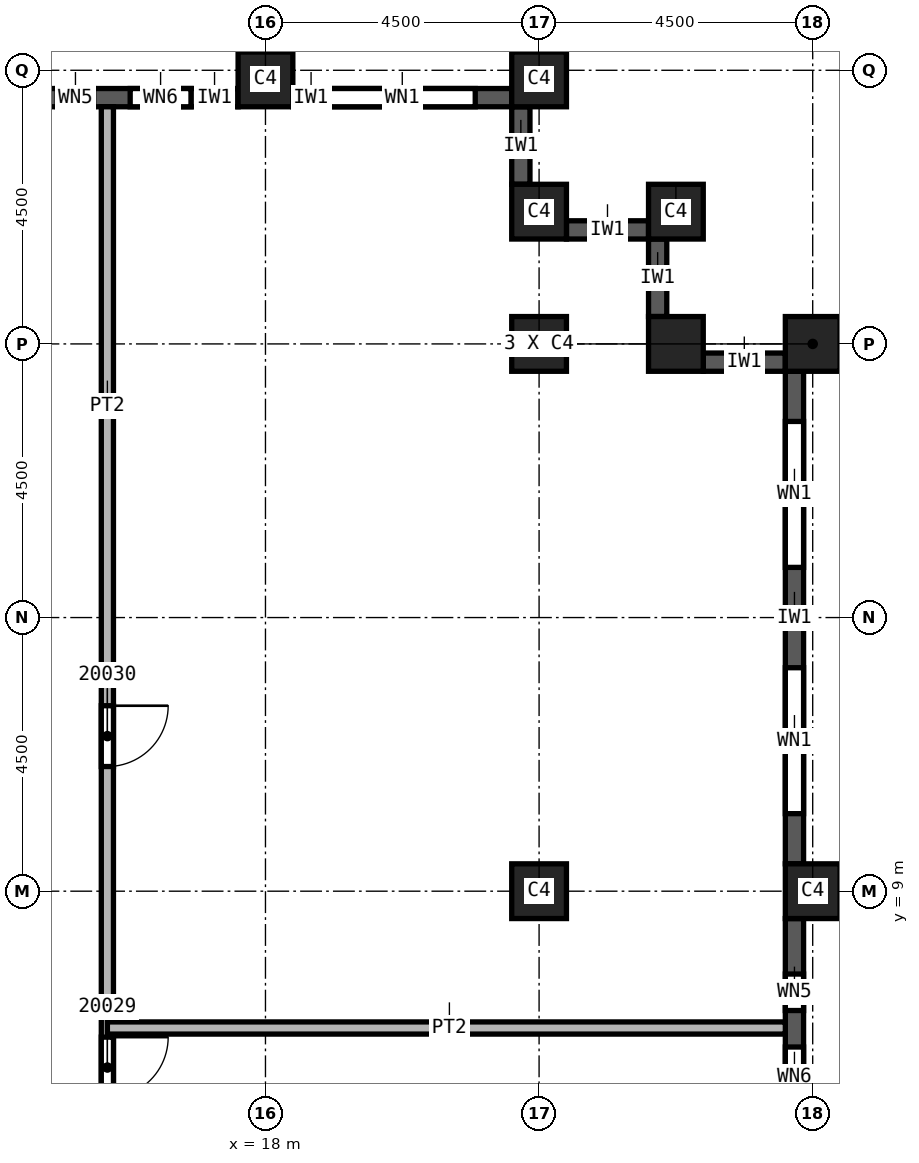
"""IFC4 building model, lengths in metres.
Left out: names, types, materials, properties, quantities, classifications, styles, units other than length and angle.
Written with IfcOpenShell. Run it as: python <this file> out.ifc"""

import sys

from ifc_helpers import new_model, si_unit, direction, frame, frame_2d, origin, origin_2d, place, context, subcontext, project, spatial, rectangle, extrude, element, fill, save


model = new_model("IFC4")
c1 = context("Model", 3, precision=1e-05, world=origin(), true_north=direction((0.0, 1.0)))
c2 = subcontext(c1, "Body", "Model", "MODEL_VIEW")
j1 = project(units=[si_unit("LENGTHUNIT", "METRE"), si_unit("PLANEANGLEUNIT", "RADIAN")], contexts=[c1])
p1 = place(None, origin())
s1 = spatial("IfcSite", under=j1, at=p1, CompositionType="ELEMENT")
p2 = place(p1, origin())
s2 = spatial("IfcBuilding", under=s1, at=p2, CompositionType="ELEMENT")
p3 = place(p2, frame((0.0, 0.0, 286.0)))
s3 = spatial("IfcBuildingStorey", under=s2, at=p3, CompositionType="ELEMENT", Elevation=286.0)
for number, where, z_axis, x_axis in (
    (1, (22.5, 9.0, 0.0), (0.0, 0.0, 1.0), (1.0, 0.0, 0.0)),
    (2, (22.5, 18.0, 0.0), (0.0, 0.0, 1.0), (1.0, 0.0, 0.0)),
    (3, (27.0, 9.0, 0.0), (0.0, 0.0, 1.0), (0.0, 1.0, 0.0)),
    (4, (27.0, 18.0, 0.0), (0.0, 0.0, 1.0), (0.0, 1.0, 0.0)),
    (5, (18.0, 22.35, 0.0), (0.0, 0.0, 1.0), (1.0, 0.0, 0.0)),
    (6, (22.5, 22.35, 0.0), (0.0, 0.0, 1.0), (1.0, 0.0, 0.0)),
    (7, (22.5, 20.175, 0.0), (0.0, 0.0, 1.0), (1.0, 0.0, 0.0)),
    (8, (24.75, 20.175, 0.0), (0.0, 0.0, 1.0), (1.0, 0.0, 0.0)),
    (9, (24.75, 18.0, 0.0), (0.0, 0.0, 1.0), (1.0, 0.0, 0.0)),
):
    element("IfcColumn", number, at=place(p3, frame(where, z_axis=z_axis, x_axis=x_axis)), inside=s3, PredefinedType="COLUMN", context=c2, shape_type="SweptSolid", body=[
        extrude(rectangle(XDim=0.9, YDim=0.9, at=origin_2d()), origin(), (0.0, 0.0, 1.0), 3.72),
    ])
p4 = place(p3, frame((26.7, 0.45, 0.0), z_axis=(0.0, 0.0, 1.0), x_axis=(0.0, 1.0, 0.0)))
e10 = element("IfcWall", 10, at=p4, inside=s3, PredefinedType="SOLIDWALL", context=c2, shape_type="SweptSolid", body=[
    extrude(rectangle(XDim=8.1, YDim=0.3, at=frame_2d((4.05, 0.0))), origin(), (0.0, 0.0, 1.0), 3.12),
])
p5 = place(p4, frame((0.875, 0.0, 0.8)))
e11 = element("IfcOpeningElement", 11, at=p5, cuts=e10, PredefinedType="OPENING", context=c2, shape_type="SweptSolid", body=[
    extrude(rectangle(XDim=1.8, YDim=1.95, at=frame_2d((0.9, 0.975))), frame((0.0, 0.15, 0.0), z_axis=(0.0, -1.0, 0.0), x_axis=(1.0, 0.0, 0.0)), (0.0, 0.0, 1.0), 0.3),
])
p6 = place(p4, frame((4.988, 0.0, 0.8)))
e12 = element("IfcOpeningElement", 12, at=p6, cuts=e10, PredefinedType="OPENING", context=c2, shape_type="SweptSolid", body=[
    extrude(rectangle(XDim=1.0, YDim=1.95, at=frame_2d((0.5, 0.975))), frame((0.0, 0.15, 0.0), z_axis=(0.0, -1.0, 0.0), x_axis=(1.0, 0.0, 0.0)), (0.0, 0.0, 1.0), 0.3),
])
p7 = place(p4, frame((6.587, 0.0, 0.8)))
e13 = element("IfcOpeningElement", 13, at=p7, cuts=e10, PredefinedType="OPENING", context=c2, shape_type="SweptSolid", body=[
    extrude(rectangle(XDim=0.6, YDim=1.95, at=frame_2d((0.3, 0.975))), frame((0.0, 0.15, 0.0), z_axis=(0.0, -1.0, 0.0), x_axis=(1.0, 0.0, 0.0)), (0.0, 0.0, 1.0), 0.3),
])
p8 = place(p3, frame((26.7, 9.45, 0.0), z_axis=(0.0, 0.0, 1.0), x_axis=(0.0, 1.0, 0.0)))
e14 = element("IfcWall", 14, at=p8, inside=s3, PredefinedType="SOLIDWALL", context=c2, shape_type="SweptSolid", body=[
    extrude(rectangle(XDim=8.1, YDim=0.3, at=frame_2d((4.05, 0.0))), origin(), (0.0, 0.0, 1.0), 3.12),
])
p9 = place(p8, frame((0.825, 0.0, 0.8)))
e15 = element("IfcOpeningElement", 15, at=p9, cuts=e14, PredefinedType="OPENING", context=c2, shape_type="SweptSolid", body=[
    extrude(rectangle(XDim=2.4, YDim=1.95, at=frame_2d((1.2, 0.975))), frame((0.0, 0.15, 0.0), z_axis=(0.0, -1.0, 0.0), x_axis=(1.0, 0.0, 0.0)), (0.0, 0.0, 1.0), 0.3),
])
p10 = place(p8, frame((4.875, 0.0, 0.8)))
e16 = element("IfcOpeningElement", 16, at=p10, cuts=e14, PredefinedType="OPENING", context=c2, shape_type="SweptSolid", body=[
    extrude(rectangle(XDim=2.4, YDim=1.95, at=frame_2d((1.2, 0.975))), frame((0.0, 0.15, 0.0), z_axis=(0.0, -1.0, 0.0), x_axis=(1.0, 0.0, 0.0)), (0.0, 0.0, 1.0), 0.3),
])
p11 = place(p3, frame((26.55, 17.7, 0.0), z_axis=(0.0, 0.0, 1.0), x_axis=(-1.0, 0.0, 0.0)))
e17 = element("IfcWall", 17, at=p11, inside=s3, PredefinedType="SOLIDWALL", context=c2, shape_type="SweptSolid", body=[
    extrude(rectangle(XDim=1.35, YDim=0.3, at=frame_2d((0.675, 0.0))), origin(), (0.0, 0.0, 1.0), 3.12),
])
p12 = place(p3, frame((24.45, 18.45, 0.0), z_axis=(0.0, 0.0, 1.0), x_axis=(0.0, 1.0, 0.0)))
e18 = element("IfcWall", 18, at=p12, inside=s3, PredefinedType="SOLIDWALL", context=c2, shape_type="SweptSolid", body=[
    extrude(rectangle(XDim=1.275, YDim=0.3, at=frame_2d((0.638, 0.0))), origin(), (0.0, 0.0, 1.0), 3.12),
])
p13 = place(p3, frame((24.3, 19.875, 0.0), z_axis=(0.0, 0.0, 1.0), x_axis=(-1.0, 0.0, 0.0)))
e19 = element("IfcWall", 19, at=p13, inside=s3, PredefinedType="SOLIDWALL", context=c2, shape_type="SweptSolid", body=[
    extrude(rectangle(XDim=1.35, YDim=0.3, at=frame_2d((0.675, 0.0))), origin(), (0.0, 0.0, 1.0), 3.12),
])
p14 = place(p3, frame((22.2, 20.625, 0.0), z_axis=(0.0, 0.0, 1.0), x_axis=(0.0, 1.0, 0.0)))
e20 = element("IfcWall", 20, at=p14, inside=s3, PredefinedType="SOLIDWALL", context=c2, shape_type="SweptSolid", body=[
    extrude(rectangle(XDim=1.275, YDim=0.3, at=frame_2d((0.637, 0.0))), origin(), (0.0, 0.0, 1.0), 3.12),
])
p15 = place(p3, frame((22.05, 22.05, 0.0), z_axis=(0.0, 0.0, 1.0), x_axis=(-1.0, 0.0, 0.0)))
e21 = element("IfcWall", 21, at=p15, inside=s3, PredefinedType="SOLIDWALL", context=c2, shape_type="SweptSolid", body=[
    extrude(rectangle(XDim=3.6, YDim=0.3, at=frame_2d((1.8, 0.0))), origin(), (0.0, 0.0, 1.0), 3.12),
])
p16 = place(p15, frame((0.6, 0.0, 0.8)))
e22 = element("IfcOpeningElement", 22, at=p16, cuts=e21, PredefinedType="OPENING", context=c2, shape_type="SweptSolid", body=[
    extrude(rectangle(XDim=2.4, YDim=1.95, at=frame_2d((1.2, 0.975))), frame((0.0, 0.15, 0.0), z_axis=(0.0, -1.0, 0.0), x_axis=(1.0, 0.0, 0.0)), (0.0, 0.0, 1.0), 0.3),
])
p17 = place(p3, frame((17.55, 22.05, 0.0), z_axis=(0.0, 0.0, 1.0), x_axis=(-1.0, 0.0, 0.0)))
e23 = element("IfcWall", 23, at=p17, inside=s3, PredefinedType="SOLIDWALL", context=c2, shape_type="SweptSolid", body=[
    extrude(rectangle(XDim=3.6, YDim=0.3, at=frame_2d((1.8, 0.0))), origin(), (0.0, 0.0, 1.0), 3.12),
])
p18 = place(p17, frame((0.775, 0.0, 0.8)))
e24 = element("IfcOpeningElement", 24, at=p18, cuts=e23, PredefinedType="OPENING", context=c2, shape_type="SweptSolid", body=[
    extrude(rectangle(XDim=1.0, YDim=1.95, at=frame_2d((0.5, 0.975))), frame((0.0, 0.15, 0.0), z_axis=(0.0, -1.0, 0.0), x_axis=(1.0, 0.0, 0.0)), (0.0, 0.0, 1.0), 0.3),
])
p19 = place(p17, frame((2.375, 0.0, 0.8)))
e25 = element("IfcOpeningElement", 25, at=p19, cuts=e23, PredefinedType="OPENING", context=c2, shape_type="SweptSolid", body=[
    extrude(rectangle(XDim=0.6, YDim=1.95, at=frame_2d((0.3, 0.975))), frame((0.0, 0.15, 0.0), z_axis=(0.0, -1.0, 0.0), x_axis=(1.0, 0.0, 0.0)), (0.0, 0.0, 1.0), 0.3),
])
p20 = place(p3, frame((15.4, 21.9, 0.0), z_axis=(0.0, 0.0, 1.0), x_axis=(0.0, -1.0, 0.0)))
e26 = element("IfcWall", 26, at=p20, inside=s3, PredefinedType="PARTITIONING", context=c2, shape_type="SweptSolid", body=[
    extrude(rectangle(XDim=43.8, YDim=0.2, at=frame_2d((21.9, 0.0))), origin(), (0.0, 0.0, 1.0), 3.72),
])
p21 = place(p20, frame((18.675, 0.0, 0.0)))
e27 = element("IfcOpeningElement", 27, at=p21, cuts=e26, PredefinedType="OPENING", context=c2, shape_type="SweptSolid", body=[
    extrude(rectangle(XDim=1.0, YDim=2.1, at=frame_2d((0.5, 1.05))), frame((0.0, 0.1, 0.0), z_axis=(0.0, -1.0, 0.0), x_axis=(1.0, 0.0, 0.0)), (0.0, 0.0, 1.0), 0.2),
])
p22 = place(p20, frame((15.3, 0.0, 0.0)))
e28 = element("IfcOpeningElement", 28, at=p22, cuts=e26, PredefinedType="OPENING", context=c2, shape_type="SweptSolid", body=[
    extrude(rectangle(XDim=1.0, YDim=2.1, at=frame_2d((0.5, 1.05))), frame((0.0, 0.1, 0.0), z_axis=(0.0, -1.0, 0.0), x_axis=(1.0, 0.0, 0.0)), (0.0, 0.0, 1.0), 0.2),
])
p23 = place(p20, frame((9.85, 0.0, 0.0)))
e29 = element("IfcOpeningElement", 29, at=p23, cuts=e26, PredefinedType="OPENING", context=c2, shape_type="SweptSolid", body=[
    extrude(rectangle(XDim=1.0, YDim=2.1, at=frame_2d((0.5, 1.05))), frame((0.0, 0.1, 0.0), z_axis=(0.0, -1.0, 0.0), x_axis=(1.0, 0.0, 0.0)), (0.0, 0.0, 1.0), 0.2),
])
p24 = place(p20, frame((42.0, 0.0, 0.0)))
e30 = element("IfcOpeningElement", 30, at=p24, cuts=e26, PredefinedType="OPENING", context=c2, shape_type="SweptSolid", body=[
    extrude(rectangle(XDim=1.0, YDim=2.1, at=frame_2d((0.5, 1.05))), frame((0.0, 0.1, 0.0), z_axis=(0.0, -1.0, 0.0), x_axis=(1.0, 0.0, 0.0)), (0.0, 0.0, 1.0), 0.2),
])
p25 = place(p20, frame((34.65, 0.0, 0.0)))
e31 = element("IfcOpeningElement", 31, at=p25, cuts=e26, PredefinedType="OPENING", context=c2, shape_type="SweptSolid", body=[
    extrude(rectangle(XDim=1.0, YDim=2.1, at=frame_2d((0.5, 1.05))), frame((0.0, 0.1, 0.0), z_axis=(0.0, -1.0, 0.0), x_axis=(1.0, 0.0, 0.0)), (0.0, 0.0, 1.0), 0.2),
])
p26 = place(p20, frame((25.95, 0.0, 0.0)))
e32 = element("IfcOpeningElement", 32, at=p26, cuts=e26, PredefinedType="OPENING", context=c2, shape_type="SweptSolid", body=[
    extrude(rectangle(XDim=1.0, YDim=2.1, at=frame_2d((0.5, 1.05))), frame((0.0, 0.1, 0.0), z_axis=(0.0, -1.0, 0.0), x_axis=(1.0, 0.0, 0.0)), (0.0, 0.0, 1.0), 0.2),
])
p27 = place(p3, frame((15.4, 6.75, 0.0), z_axis=(0.0, 0.0, 1.0), x_axis=(1.0, 0.0, 0.0)))
e33 = element("IfcWall", 33, at=p27, inside=s3, PredefinedType="PARTITIONING", context=c2, shape_type="SweptSolid", body=[
    extrude(rectangle(XDim=11.15, YDim=0.2, at=frame_2d((5.575, 0.0))), origin(), (0.0, 0.0, 1.0), 3.72),
])
p28 = place(p9, origin())
e34 = element("IfcWindow", 34, at=p28, inside=s3, PartitioningType="SINGLE_PANEL", PredefinedType="WINDOW", context=c2, shape_type="SweptSolid", body=[
    extrude(rectangle(XDim=2.4, YDim=1.95, at=frame_2d((1.2, 0.975))), frame((0.0, 0.03, 0.0), z_axis=(0.0, -1.0, 0.0), x_axis=(1.0, 0.0, 0.0)), (0.0, 0.0, 1.0), 0.06),
])
fill(e15, e34)
p29 = place(p10, origin())
e35 = element("IfcWindow", 35, at=p29, inside=s3, PartitioningType="SINGLE_PANEL", PredefinedType="WINDOW", context=c2, shape_type="SweptSolid", body=[
    extrude(rectangle(XDim=2.4, YDim=1.95, at=frame_2d((1.2, 0.975))), frame((0.0, 0.03, 0.0), z_axis=(0.0, -1.0, 0.0), x_axis=(1.0, 0.0, 0.0)), (0.0, 0.0, 1.0), 0.06),
])
fill(e16, e35)
p30 = place(p16, origin())
e36 = element("IfcWindow", 36, at=p30, inside=s3, PartitioningType="SINGLE_PANEL", PredefinedType="WINDOW", context=c2, shape_type="SweptSolid", body=[
    extrude(rectangle(XDim=2.4, YDim=1.95, at=frame_2d((1.2, 0.975))), frame((0.0, 0.03, 0.0), z_axis=(0.0, -1.0, 0.0), x_axis=(1.0, 0.0, 0.0)), (0.0, 0.0, 1.0), 0.06),
])
fill(e22, e36)
p31 = place(p22, origin())
e37 = element("IfcDoor", 37, at=p31, inside=s3, OperationType="SINGLE_SWING_RIGHT", PredefinedType="DOOR", context=c2, shape_type="SweptSolid", body=[
    extrude(rectangle(XDim=1.0, YDim=2.1, at=frame_2d((0.5, 1.05))), frame((0.0, 0.025, 0.0), z_axis=(0.0, -1.0, 0.0), x_axis=(1.0, 0.0, 0.0)), (0.0, 0.0, 1.0), 0.05),
])
fill(e28, e37)
p32 = place(p23, origin())
e38 = element("IfcDoor", 38, at=p32, inside=s3, OperationType="SINGLE_SWING_LEFT", PredefinedType="DOOR", context=c2, shape_type="SweptSolid", body=[
    extrude(rectangle(XDim=1.0, YDim=2.1, at=frame_2d((0.5, 1.05))), frame((0.0, 0.025, 0.0), z_axis=(0.0, -1.0, 0.0), x_axis=(1.0, 0.0, 0.0)), (0.0, 0.0, 1.0), 0.05),
])
fill(e29, e38)
p33 = place(p6, origin())
e39 = element("IfcWindow", 39, at=p33, inside=s3, PartitioningType="SINGLE_PANEL", PredefinedType="WINDOW", context=c2, shape_type="SweptSolid", body=[
    extrude(rectangle(XDim=1.0, YDim=1.95, at=frame_2d((0.5, 0.975))), frame((0.0, 0.03, 0.0), z_axis=(0.0, -1.0, 0.0), x_axis=(1.0, 0.0, 0.0)), (0.0, 0.0, 1.0), 0.06),
])
fill(e12, e39)
p34 = place(p7, origin())
e40 = element("IfcWindow", 40, at=p34, inside=s3, PartitioningType="SINGLE_PANEL", PredefinedType="WINDOW", context=c2, shape_type="SweptSolid", body=[
    extrude(rectangle(XDim=0.6, YDim=1.95, at=frame_2d((0.3, 0.975))), frame((0.0, 0.03, 0.0), z_axis=(0.0, -1.0, 0.0), x_axis=(1.0, 0.0, 0.0)), (0.0, 0.0, 1.0), 0.06),
])
fill(e13, e40)
p35 = place(p18, origin())
e41 = element("IfcWindow", 41, at=p35, inside=s3, PartitioningType="SINGLE_PANEL", PredefinedType="WINDOW", context=c2, shape_type="SweptSolid", body=[
    extrude(rectangle(XDim=1.0, YDim=1.95, at=frame_2d((0.5, 0.975))), frame((0.0, 0.03, 0.0), z_axis=(0.0, -1.0, 0.0), x_axis=(1.0, 0.0, 0.0)), (0.0, 0.0, 1.0), 0.06),
])
fill(e24, e41)
p36 = place(p19, origin())
e42 = element("IfcWindow", 42, at=p36, inside=s3, PartitioningType="SINGLE_PANEL", PredefinedType="WINDOW", context=c2, shape_type="SweptSolid", body=[
    extrude(rectangle(XDim=0.6, YDim=1.95, at=frame_2d((0.3, 0.975))), frame((0.0, 0.03, 0.0), z_axis=(0.0, -1.0, 0.0), x_axis=(1.0, 0.0, 0.0)), (0.0, 0.0, 1.0), 0.06),
])
fill(e25, e42)
save(model, sys.argv[1])
